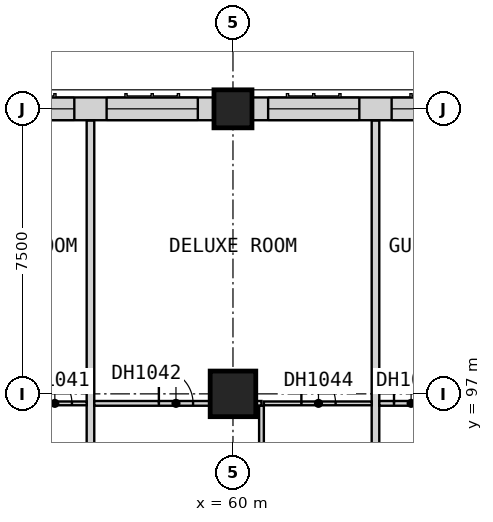
"""IFC4 building model, lengths in metres.
Left out: names, types, materials, properties, quantities, classifications, styles, units other than length and angle.
Written with IfcOpenShell. Run it as: python <this file> out.ifc"""

import sys

from ifc_helpers import new_model, si_unit, direction, frame, frame_2d, origin, origin_2d, place, context, subcontext, project, spatial, rectangle, extrude, element, fill, save


model = new_model("IFC4")
c1 = context("Model", 3, precision=1e-05, world=origin(), true_north=direction((0.0, 1.0)))
c2 = subcontext(c1, "Body", "Model", "MODEL_VIEW")
j1 = project(units=[si_unit("LENGTHUNIT", "METRE"), si_unit("PLANEANGLEUNIT", "RADIAN")], contexts=[c1])
p1 = place(None, origin())
s1 = spatial("IfcSite", under=j1, at=p1, CompositionType="ELEMENT")
p2 = place(p1, origin())
s2 = spatial("IfcBuilding", under=s1, at=p2, CompositionType="ELEMENT")
p3 = place(p2, frame((0.0, 0.0, 48.4)))
s3 = spatial("IfcBuildingStorey", under=s2, at=p3, CompositionType="ELEMENT", Elevation=48.4)
p4 = place(p3, frame((60.0, 97.0, 0.0), z_axis=(0.0, 0.0, 1.0), x_axis=(1.0, 0.0, 0.0)))
e1 = element("IfcColumn", 1, at=p4, inside=s3, PredefinedType="COLUMN", context=c2, shape_type="SweptSolid", body=[
    extrude(rectangle(XDim=1.2, YDim=1.2, at=origin_2d()), origin(), (0.0, 0.0, 1.0), 3.6),
])
p5 = place(p3, frame((60.0, 104.5, 0.0), z_axis=(0.0, 0.0, 1.0), x_axis=(1.0, 0.0, 0.0)))
e2 = element("IfcColumn", 2, at=p5, inside=s3, PredefinedType="COLUMN", context=c2, shape_type="SweptSolid", body=[
    extrude(rectangle(XDim=1.0, YDim=1.0, at=origin_2d()), origin(), (0.0, 0.0, 1.0), 3.6),
])
p6 = place(p3, frame((67.0, 104.5, 0.0), z_axis=(0.0, 0.0, 1.0), x_axis=(-1.0, 0.0, 0.0)))
e3 = element("IfcWall", 3, at=p6, inside=s3, PredefinedType="SOLIDWALL", context=c2, shape_type="SweptSolid", body=[
    extrude(rectangle(XDim=6.5, YDim=0.6, at=frame_2d((3.25, 0.0))), origin(), (0.0, 0.0, 1.0), 2.85),
])
p7 = place(p6, frame((3.675, 0.0, 0.8)))
e4 = element("IfcOpeningElement", 4, at=p7, cuts=e3, PredefinedType="OPENING", context=c2, shape_type="SweptSolid", body=[
    extrude(rectangle(XDim=2.4, YDim=1.8, at=frame_2d((1.2, 0.9))), frame((0.0, 0.31, 0.0), z_axis=(0.0, -1.0, 0.0), x_axis=(1.0, 0.0, 0.0)), (0.0, 0.0, 1.0), 0.62),
])
p8 = place(p6, frame((0.425, 0.0, 0.8)))
e5 = element("IfcOpeningElement", 5, at=p8, cuts=e3, PredefinedType="OPENING", context=c2, shape_type="SweptSolid", body=[
    extrude(rectangle(XDim=2.4, YDim=1.8, at=frame_2d((1.2, 0.9))), frame((0.0, 0.31, 0.0), z_axis=(0.0, -1.0, 0.0), x_axis=(1.0, 0.0, 0.0)), (0.0, 0.0, 1.0), 0.62),
])
p9 = place(p3, frame((59.5, 104.5, 0.0), z_axis=(0.0, 0.0, 1.0), x_axis=(-1.0, 0.0, 0.0)))
e6 = element("IfcWall", 6, at=p9, inside=s3, PredefinedType="SOLIDWALL", context=c2, shape_type="SweptSolid", body=[
    extrude(rectangle(XDim=6.5, YDim=0.6, at=frame_2d((3.25, 0.0))), origin(), (0.0, 0.0, 1.0), 2.85),
])
p10 = place(p9, frame((3.675, 0.0, 0.8)))
e7 = element("IfcOpeningElement", 7, at=p10, cuts=e6, PredefinedType="OPENING", context=c2, shape_type="SweptSolid", body=[
    extrude(rectangle(XDim=2.4, YDim=1.8, at=frame_2d((1.2, 0.9))), frame((0.0, 0.31, 0.0), z_axis=(0.0, -1.0, 0.0), x_axis=(1.0, 0.0, 0.0)), (0.0, 0.0, 1.0), 0.62),
])
p11 = place(p9, frame((0.425, 0.0, 0.8)))
e8 = element("IfcOpeningElement", 8, at=p11, cuts=e6, PredefinedType="OPENING", context=c2, shape_type="SweptSolid", body=[
    extrude(rectangle(XDim=2.4, YDim=1.8, at=frame_2d((1.2, 0.9))), frame((0.0, 0.31, 0.0), z_axis=(0.0, -1.0, 0.0), x_axis=(1.0, 0.0, 0.0)), (0.0, 0.0, 1.0), 0.62),
])
for number, where, z_axis, x_axis in (
    (9, (56.25, 92.475, 0.0), (0.0, 0.0, 1.0), (0.0, 1.0, 0.0)),
    (10, (63.75, 92.475, 0.0), (0.0, 0.0, 1.0), (0.0, 1.0, 0.0)),
):
    element("IfcWall", number, at=place(p3, frame(where, z_axis=z_axis, x_axis=x_axis)), inside=s3, PredefinedType="PARTITIONING", context=c2, shape_type="SweptSolid", body=[
        extrude(rectangle(XDim=11.715, YDim=0.2, at=frame_2d((5.857, 0.0))), origin(), (0.0, 0.0, 1.0), 3.35),
    ])
p12 = place(p3, frame((54.438, 96.75, 0.0), z_axis=(0.0, 0.0, 1.0), x_axis=(1.0, 0.0, 0.0)))
e11 = element("IfcWall", 11, at=p12, inside=s3, PredefinedType="PARTITIONING", context=c2, shape_type="SweptSolid", body=[
    extrude(rectangle(XDim=1.712, YDim=0.1, at=frame_2d((0.856, 0.0))), origin(), (0.0, 0.0, 1.0), 3.35),
])
p13 = place(p12, frame((0.425, 0.0, 0.0)))
e12 = element("IfcOpeningElement", 12, at=p13, cuts=e11, PredefinedType="OPENING", context=c2, shape_type="SweptSolid", body=[
    extrude(rectangle(XDim=0.9, YDim=2.1, at=frame_2d((0.45, 1.05))), frame((0.0, 0.06, 0.0), z_axis=(0.0, -1.0, 0.0), x_axis=(1.0, 0.0, 0.0)), (0.0, 0.0, 1.0), 0.12),
])
p14 = place(p3, frame((60.812, 96.75, 0.0), z_axis=(0.0, 0.0, 1.0), x_axis=(1.0, 0.0, 0.0)))
e13 = element("IfcWall", 13, at=p14, inside=s3, PredefinedType="PARTITIONING", context=c2, shape_type="SweptSolid", body=[
    extrude(rectangle(XDim=2.837, YDim=0.1, at=frame_2d((1.419, 0.0))), origin(), (0.0, 0.0, 1.0), 3.35),
])
p15 = place(p14, frame((0.988, 0.0, 0.0)))
e14 = element("IfcOpeningElement", 14, at=p15, cuts=e13, PredefinedType="OPENING", context=c2, shape_type="SweptSolid", body=[
    extrude(rectangle(XDim=0.9, YDim=2.1, at=frame_2d((0.45, 1.05))), frame((0.0, 0.06, 0.0), z_axis=(0.0, -1.0, 0.0), x_axis=(1.0, 0.0, 0.0)), (0.0, 0.0, 1.0), 0.12),
])
p16 = place(p3, frame((56.35, 96.75, 0.0), z_axis=(0.0, 0.0, 1.0), x_axis=(1.0, 0.0, 0.0)))
e15 = element("IfcWall", 15, at=p16, inside=s3, PredefinedType="PARTITIONING", context=c2, shape_type="SweptSolid", body=[
    extrude(rectangle(XDim=4.4, YDim=0.125, at=frame_2d((2.2, 0.0))), origin(), (0.0, 0.0, 1.0), 3.35),
])
p17 = place(p16, frame((1.7, 0.0, 0.0)))
e16 = element("IfcOpeningElement", 16, at=p17, cuts=e15, PredefinedType="OPENING", context=c2, shape_type="SweptSolid", body=[
    extrude(rectangle(XDim=0.9, YDim=2.1, at=frame_2d((0.45, 1.05))), frame((0.0, 0.073, 0.0), z_axis=(0.0, -1.0, 0.0), x_axis=(1.0, 0.0, 0.0)), (0.0, 0.0, 1.0), 0.145),
])
p18 = place(p3, frame((63.85, 96.75, 0.0), z_axis=(0.0, 0.0, 1.0), x_axis=(1.0, 0.0, 0.0)))
e17 = element("IfcWall", 17, at=p18, inside=s3, PredefinedType="PARTITIONING", context=c2, shape_type="SweptSolid", body=[
    extrude(rectangle(XDim=1.775, YDim=0.125, at=frame_2d((0.887, 0.0))), origin(), (0.0, 0.0, 1.0), 3.35),
])
p19 = place(p18, frame((0.387, 0.0, 0.0)))
e18 = element("IfcOpeningElement", 18, at=p19, cuts=e17, PredefinedType="OPENING", context=c2, shape_type="SweptSolid", body=[
    extrude(rectangle(XDim=0.9, YDim=2.1, at=frame_2d((0.45, 1.05))), frame((0.0, 0.073, 0.0), z_axis=(0.0, -1.0, 0.0), x_axis=(1.0, 0.0, 0.0)), (0.0, 0.0, 1.0), 0.145),
])
p20 = place(p3, frame((60.75, 92.475, 0.0), z_axis=(0.0, 0.0, 1.0), x_axis=(0.0, 1.0, 0.0)))
e19 = element("IfcWall", 19, at=p20, inside=s3, PredefinedType="PARTITIONING", context=c2, shape_type="SweptSolid", body=[
    extrude(rectangle(XDim=4.212, YDim=0.125, at=frame_2d((2.106, 0.0))), origin(), (0.0, 0.0, 1.0), 3.35),
])
p21 = place(p7, origin())
e20 = element("IfcWindow", 20, at=p21, inside=s3, PartitioningType="SINGLE_PANEL", PredefinedType="WINDOW", context=c2, shape_type="SweptSolid", body=[
    extrude(rectangle(XDim=2.4, YDim=1.8, at=frame_2d((1.2, 0.9))), frame((0.0, -0.07, 0.0), z_axis=(0.0, -1.0, 0.0), x_axis=(1.0, 0.0, 0.0)), (0.0, 0.0, 1.0), 0.06),
])
fill(e4, e20)
p22 = place(p8, origin())
e21 = element("IfcWindow", 21, at=p22, inside=s3, PartitioningType="SINGLE_PANEL", PredefinedType="WINDOW", context=c2, shape_type="SweptSolid", body=[
    extrude(rectangle(XDim=2.4, YDim=1.8, at=frame_2d((1.2, 0.9))), frame((0.0, -0.07, 0.0), z_axis=(0.0, -1.0, 0.0), x_axis=(1.0, 0.0, 0.0)), (0.0, 0.0, 1.0), 0.06),
])
fill(e5, e21)
p23 = place(p10, origin())
e22 = element("IfcWindow", 22, at=p23, inside=s3, PartitioningType="SINGLE_PANEL", PredefinedType="WINDOW", context=c2, shape_type="SweptSolid", body=[
    extrude(rectangle(XDim=2.4, YDim=1.8, at=frame_2d((1.2, 0.9))), frame((0.0, -0.07, 0.0), z_axis=(0.0, -1.0, 0.0), x_axis=(1.0, 0.0, 0.0)), (0.0, 0.0, 1.0), 0.06),
])
fill(e7, e22)
p24 = place(p11, origin())
e23 = element("IfcWindow", 23, at=p24, inside=s3, PartitioningType="SINGLE_PANEL", PredefinedType="WINDOW", context=c2, shape_type="SweptSolid", body=[
    extrude(rectangle(XDim=2.4, YDim=1.8, at=frame_2d((1.2, 0.9))), frame((0.0, -0.07, 0.0), z_axis=(0.0, -1.0, 0.0), x_axis=(1.0, 0.0, 0.0)), (0.0, 0.0, 1.0), 0.06),
])
fill(e8, e23)
p25 = place(p13, origin())
e24 = element("IfcDoor", 24, at=p25, inside=s3, OperationType="SINGLE_SWING_RIGHT", PredefinedType="DOOR", context=c2, shape_type="SweptSolid", body=[
    extrude(rectangle(XDim=0.9, YDim=2.1, at=frame_2d((0.45, 1.05))), frame((0.0, 0.025, 0.0), z_axis=(0.0, -1.0, 0.0), x_axis=(1.0, 0.0, 0.0)), (0.0, 0.0, 1.0), 0.05),
])
fill(e12, e24)
p26 = place(p17, origin())
e25 = element("IfcDoor", 25, at=p26, inside=s3, OperationType="SINGLE_SWING_RIGHT", PredefinedType="DOOR", context=c2, shape_type="SweptSolid", body=[
    extrude(rectangle(XDim=0.9, YDim=2.1, at=frame_2d((0.45, 1.05))), frame((0.0, 0.025, 0.0), z_axis=(0.0, -1.0, 0.0), x_axis=(1.0, 0.0, 0.0)), (0.0, 0.0, 1.0), 0.05),
])
fill(e16, e25)
p27 = place(p15, origin())
e26 = element("IfcDoor", 26, at=p27, inside=s3, OperationType="SINGLE_SWING_RIGHT", PredefinedType="DOOR", context=c2, shape_type="SweptSolid", body=[
    extrude(rectangle(XDim=0.9, YDim=2.1, at=frame_2d((0.45, 1.05))), frame((0.0, 0.025, 0.0), z_axis=(0.0, -1.0, 0.0), x_axis=(1.0, 0.0, 0.0)), (0.0, 0.0, 1.0), 0.05),
])
fill(e14, e26)
p28 = place(p19, origin())
e27 = element("IfcDoor", 27, at=p28, inside=s3, OperationType="SINGLE_SWING_RIGHT", PredefinedType="DOOR", context=c2, shape_type="SweptSolid", body=[
    extrude(rectangle(XDim=0.9, YDim=2.1, at=frame_2d((0.45, 1.05))), frame((0.0, 0.025, 0.0), z_axis=(0.0, -1.0, 0.0), x_axis=(1.0, 0.0, 0.0)), (0.0, 0.0, 1.0), 0.05),
])
fill(e18, e27)
save(model, sys.argv[1])
